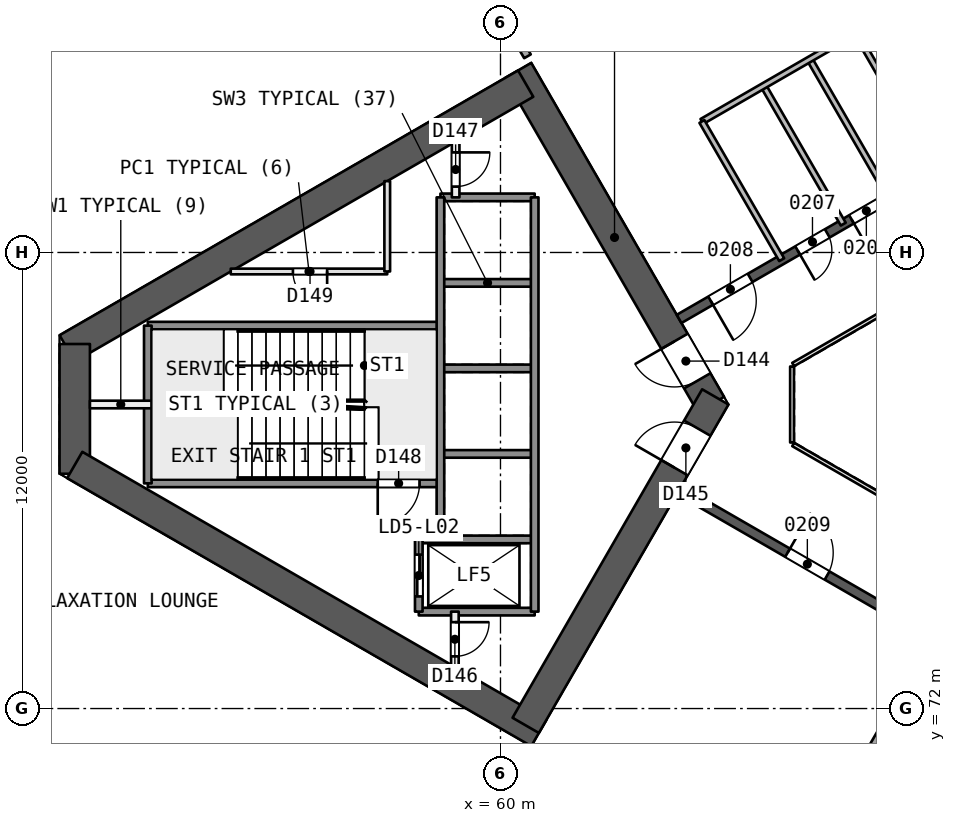
"""IFC4 building model, lengths in metres.
Left out: names, types, materials, properties, quantities, classifications, styles, units other than length and angle.
Written with IfcOpenShell. Run it as: python <this file> out.ifc"""

import sys

from ifc_helpers import new_model, si_unit, direction, frame, frame_2d, origin, place, context, subcontext, project, spatial, rectangle, extrude, element, fill, save


model = new_model("IFC4")
c1 = context("Model", 3, precision=1e-05, world=origin(), true_north=direction((0.0, 1.0)))
c2 = subcontext(c1, "Body", "Model", "MODEL_VIEW")
j1 = project(units=[si_unit("LENGTHUNIT", "METRE"), si_unit("PLANEANGLEUNIT", "RADIAN")], contexts=[c1])
p1 = place(None, origin())
s1 = spatial("IfcSite", under=j1, at=p1, CompositionType="ELEMENT")
p2 = place(p1, origin())
s2 = spatial("IfcBuilding", under=s1, at=p2, CompositionType="ELEMENT")
p3 = place(p2, frame((0.0, 0.0, 15.0)))
s3 = spatial("IfcBuildingStorey", under=s2, at=p3, CompositionType="ELEMENT", Elevation=15.0)
p4 = place(p3, frame((65.538, 80.0, 0.0), z_axis=(0.0, 0.0, 1.0), x_axis=(-0.49999662545, 0.866027352073, 0.0)))
e1 = element("IfcWall", 1, at=p4, inside=s3, PredefinedType="SHEAR", context=c2, shape_type="SweptSolid", body=[
    extrude(rectangle(XDim=10.149, YDim=0.8, at=frame_2d((5.074, 0.0))), origin(), (0.0, 0.0, 1.0), 5.4),
])
p5 = place(p4, frame((0.719, 0.0, 0.0)))
e2 = element("IfcOpeningElement", 2, at=p5, cuts=e1, PredefinedType="OPENING", context=c2, shape_type="SweptSolid", body=[
    extrude(rectangle(XDim=1.2, YDim=2.1, at=frame_2d((0.6, 1.05))), frame((0.0, 0.411, 0.0), z_axis=(0.0, -1.0, 0.0), x_axis=(1.0, 0.0, 0.0)), (0.0, 0.0, 1.0), 0.821),
])
p6 = place(p3, frame((60.664, 88.443, 0.0), z_axis=(0.0, 0.0, 1.0), x_axis=(-0.866029478545, -0.499992942241, 0.0)))
e3 = element("IfcWall", 3, at=p6, inside=s3, PredefinedType="SHEAR", context=c2, shape_type="SweptSolid", body=[
    extrude(rectangle(XDim=13.933, YDim=0.8, at=frame_2d((6.967, 0.0))), origin(), (0.0, 0.0, 1.0), 5.4),
])
p7 = place(p3, frame((48.797, 81.592, 0.0), z_axis=(0.0, 0.0, 1.0), x_axis=(0.0, -1.0, 0.0)))
e4 = element("IfcWall", 4, at=p7, inside=s3, PredefinedType="SHEAR", context=c2, shape_type="SweptSolid", body=[
    extrude(rectangle(XDim=3.415, YDim=0.8, at=frame_2d((1.707, 0.0))), origin(), (0.0, 0.0, 1.0), 5.4),
])
p8 = place(p3, frame((48.797, 78.408, 0.0), z_axis=(0.0, 0.0, 1.0), x_axis=(0.866032504327, -0.499987701298, 0.0)))
e5 = element("IfcWall", 5, at=p8, inside=s3, PredefinedType="SHEAR", context=c2, shape_type="SweptSolid", body=[
    extrude(rectangle(XDim=14.102, YDim=0.8, at=frame_2d((7.051, 0.0))), origin(), (0.0, 0.0, 1.0), 5.4),
])
p9 = place(p3, frame((60.664, 71.557, 0.0), z_axis=(0.0, 0.0, 1.0), x_axis=(0.50000409368, 0.866023040284, 0.0)))
e6 = element("IfcWall", 6, at=p9, inside=s3, PredefinedType="SHEAR", context=c2, shape_type="SweptSolid", body=[
    extrude(rectangle(XDim=9.98, YDim=0.8, at=frame_2d((4.99, 0.0))), origin(), (0.0, 0.0, 1.0), 5.4),
])
p10 = place(p9, frame((7.83, 0.0, 0.0)))
e7 = element("IfcOpeningElement", 7, at=p10, cuts=e6, PredefinedType="OPENING", context=c2, shape_type="SweptSolid", body=[
    extrude(rectangle(XDim=1.2, YDim=2.1, at=frame_2d((0.6, 1.05))), frame((0.0, 0.411, 0.0), z_axis=(0.0, -1.0, 0.0), x_axis=(1.0, 0.0, 0.0)), (0.0, 0.0, 1.0), 0.821),
])
p11 = place(p3, frame((78.2, 90.046, 0.0), z_axis=(0.0, 0.0, 1.0), x_axis=(-0.866026492143, -0.499998114903, 0.0)))
e8 = element("IfcWall", 8, at=p11, inside=s3, PredefinedType="SHEAR", context=c2, shape_type="SweptSolid", body=[
    extrude(rectangle(XDim=15.588, YDim=0.25, at=frame_2d((7.794, 0.0))), origin(), (0.0, 0.0, 1.0), 5.0),
])
p12 = place(p11, frame((3.297, 0.0, 0.0)))
e9 = element("IfcOpeningElement", 9, at=p12, cuts=e8, PredefinedType="OPENING", context=c2, shape_type="SweptSolid", body=[
    extrude(rectangle(XDim=1.2, YDim=2.4, at=frame_2d((0.6, 1.2))), frame((0.0, 0.135, 0.0), z_axis=(0.0, -1.0, 0.0), x_axis=(1.0, 0.0, 0.0)), (0.0, 0.0, 1.0), 0.271),
])
p13 = place(p11, frame((8.046, 0.0, 0.0)))
e10 = element("IfcOpeningElement", 10, at=p13, cuts=e8, PredefinedType="OPENING", context=c2, shape_type="SweptSolid", body=[
    extrude(rectangle(XDim=0.9, YDim=2.1, at=frame_2d((0.45, 1.05))), frame((0.0, 0.135, 0.0), z_axis=(0.0, -1.0, 0.0), x_axis=(1.0, 0.0, 0.0)), (0.0, 0.0, 1.0), 0.271),
])
p14 = place(p11, frame((9.449, 0.0, 0.0)))
e11 = element("IfcOpeningElement", 11, at=p14, cuts=e8, PredefinedType="OPENING", context=c2, shape_type="SweptSolid", body=[
    extrude(rectangle(XDim=0.9, YDim=2.1, at=frame_2d((0.45, 1.05))), frame((0.0, 0.135, 0.0), z_axis=(0.0, -1.0, 0.0), x_axis=(1.0, 0.0, 0.0)), (0.0, 0.0, 1.0), 0.271),
])
p15 = place(p11, frame((11.085, 0.0, 0.0)))
e12 = element("IfcOpeningElement", 12, at=p15, cuts=e8, PredefinedType="OPENING", context=c2, shape_type="SweptSolid", body=[
    extrude(rectangle(XDim=0.9, YDim=2.1, at=frame_2d((0.45, 1.05))), frame((0.0, 0.135, 0.0), z_axis=(0.0, -1.0, 0.0), x_axis=(1.0, 0.0, 0.0)), (0.0, 0.0, 1.0), 0.271),
])
p16 = place(p11, frame((13.43, 0.0, 0.0)))
e13 = element("IfcOpeningElement", 13, at=p16, cuts=e8, PredefinedType="OPENING", context=c2, shape_type="SweptSolid", body=[
    extrude(rectangle(XDim=1.2, YDim=2.4, at=frame_2d((0.6, 1.2))), frame((0.0, 0.135, 0.0), z_axis=(0.0, -1.0, 0.0), x_axis=(1.0, 0.0, 0.0)), (0.0, 0.0, 1.0), 0.271),
])
p17 = place(p3, frame((64.7, 77.748, 0.0), z_axis=(0.0, 0.0, 1.0), x_axis=(0.866026492143, -0.499998114903, 0.0)))
e14 = element("IfcWall", 14, at=p17, inside=s3, PredefinedType="SHEAR", context=c2, shape_type="SweptSolid", body=[
    extrude(rectangle(XDim=15.588, YDim=0.25, at=frame_2d((7.794, 0.0))), origin(), (0.0, 0.0, 1.0), 5.0),
])
p18 = place(p17, frame((3.297, 0.0, 0.0)))
e15 = element("IfcOpeningElement", 15, at=p18, cuts=e14, PredefinedType="OPENING", context=c2, shape_type="SweptSolid", body=[
    extrude(rectangle(XDim=1.2, YDim=2.4, at=frame_2d((0.6, 1.2))), frame((0.0, 0.135, 0.0), z_axis=(0.0, -1.0, 0.0), x_axis=(1.0, 0.0, 0.0)), (0.0, 0.0, 1.0), 0.271),
])
p19 = place(p17, frame((11.091, 0.0, 0.0)))
e16 = element("IfcOpeningElement", 16, at=p19, cuts=e14, PredefinedType="OPENING", context=c2, shape_type="SweptSolid", body=[
    extrude(rectangle(XDim=1.2, YDim=2.4, at=frame_2d((0.6, 1.2))), frame((0.0, 0.135, 0.0), z_axis=(0.0, -1.0, 0.0), x_axis=(1.0, 0.0, 0.0)), (0.0, 0.0, 1.0), 0.271),
])
p20 = place(p3, frame((69.35, 89.786, 0.0), z_axis=(0.0, 0.0, 1.0), x_axis=(0.499958946799, -0.866049104564, 0.0)))
e17 = element("IfcWall", 17, at=p20, inside=s3, PredefinedType="PARTITIONING", context=c2, shape_type="SweptSolid", body=[
    extrude(rectangle(XDim=4.2, YDim=0.15, at=frame_2d((2.1, 0.0))), origin(), (0.0, 0.0, 1.0), 5.0),
])
p21 = place(p3, frame((68.135, 89.085, 0.0), z_axis=(0.0, 0.0, 1.0), x_axis=(0.500002543286, -0.866023935413, 0.0)))
e18 = element("IfcWall", 18, at=p21, inside=s3, PredefinedType="PARTITIONING", context=c2, shape_type="SweptSolid", body=[
    extrude(rectangle(XDim=4.2, YDim=0.15, at=frame_2d((2.1, 0.0))), origin(), (0.0, 0.0, 1.0), 5.0),
])
p22 = place(p3, frame((66.92, 88.383, 0.0), z_axis=(0.0, 0.0, 1.0), x_axis=(0.500027713859, -0.866009402589, 0.0)))
e19 = element("IfcWall", 19, at=p22, inside=s3, PredefinedType="PARTITIONING", context=c2, shape_type="SweptSolid", body=[
    extrude(rectangle(XDim=4.2, YDim=0.15, at=frame_2d((2.1, 0.0))), origin(), (0.0, 0.0, 1.0), 5.0),
])
p23 = place(p3, frame((69.351, 89.785, 0.0), z_axis=(0.0, 0.0, 1.0), x_axis=(-0.866040404911, -0.499974016386, 0.0)))
e20 = element("IfcWall", 20, at=p23, inside=s3, PredefinedType="PARTITIONING", context=c2, shape_type="SweptSolid", body=[
    extrude(rectangle(XDim=4.677, YDim=0.15, at=frame_2d((2.338, 0.0))), origin(), (0.0, 0.0, 1.0), 5.0),
])
p24 = place(p3, frame((65.301, 87.447, 0.0), z_axis=(0.0, 0.0, 1.0), x_axis=(0.499972428603, -0.866041321553, 0.0)))
e21 = element("IfcWall", 21, at=p24, inside=s3, PredefinedType="PARTITIONING", context=c2, shape_type="SweptSolid", body=[
    extrude(rectangle(XDim=4.199, YDim=0.15, at=frame_2d((2.1, 0.0))), origin(), (0.0, 0.0, 1.0), 5.0),
])
p25 = place(p3, frame((57.274, 95.115, 0.0), z_axis=(0.0, 0.0, 1.0), x_axis=(0.499985838573, -0.866033579734, 0.0)))
e22 = element("IfcWall", 22, at=p25, inside=s3, PredefinedType="PARTITIONING", context=c2, shape_type="SweptSolid", body=[
    extrude(rectangle(XDim=6.874, YDim=0.2, at=frame_2d((3.437, 0.0))), origin(), (0.0, 0.0, 1.0), 5.0),
])
p26 = place(p3, frame((60.85, 55.491, 0.0), z_axis=(0.0, 0.0, 1.0), x_axis=(0.499994584841, 0.866028530205, 0.0)))
e23 = element("IfcWall", 23, at=p26, inside=s3, PredefinedType="PARTITIONING", context=c2, shape_type="SweptSolid", body=[
    extrude(rectangle(XDim=21.201, YDim=0.2, at=frame_2d((10.601, 0.0))), origin(), (0.0, 0.0, 1.0), 5.0),
])
p27 = place(p3, frame((26.66, 85.0, 0.0), z_axis=(0.0, 0.0, 1.0), x_axis=(0.866025599265, 0.499999661418, 0.0)))
e24 = element("IfcWall", 24, at=p27, inside=s3, PredefinedType="SOLIDWALL", context=c2, shape_type="SweptSolid", body=[
    extrude(rectangle(XDim=78.727, YDim=0.4, at=frame_2d((39.364, 0.0))), origin(), (0.0, 0.0, 1.0), 5.0),
])
p28 = place(p27, frame((42.061, 0.0, 0.9)))
e25 = element("IfcOpeningElement", 25, at=p28, cuts=e24, PredefinedType="OPENING", context=c2, shape_type="SweptSolid", body=[
    extrude(rectangle(XDim=2.4, YDim=2.4, at=frame_2d((1.2, 1.2))), frame((0.0, 0.21, 0.0), z_axis=(0.0, -1.0, 0.0), x_axis=(1.0, 0.0, 0.0)), (0.0, 0.0, 1.0), 0.421),
])
p29 = place(p27, frame((34.267, 0.0, 0.9)))
e26 = element("IfcOpeningElement", 26, at=p29, cuts=e24, PredefinedType="OPENING", context=c2, shape_type="SweptSolid", body=[
    extrude(rectangle(XDim=2.4, YDim=2.4, at=frame_2d((1.2, 1.2))), frame((0.0, 0.21, 0.0), z_axis=(0.0, -1.0, 0.0), x_axis=(1.0, 0.0, 0.0)), (0.0, 0.0, 1.0), 0.421),
])
p30 = place(p3, frame((94.84, 35.636, 0.0), z_axis=(0.0, 0.0, 1.0), x_axis=(-0.866025599265, 0.499999661418, 0.0)))
e27 = element("IfcWall", 27, at=p30, inside=s3, PredefinedType="SOLIDWALL", context=c2, shape_type="SweptSolid", body=[
    extrude(rectangle(XDim=78.727, YDim=0.4, at=frame_2d((39.364, 0.0))), origin(), (0.0, 0.0, 1.0), 5.0),
])
p31 = place(p30, frame((42.061, 0.0, 0.9)))
e28 = element("IfcOpeningElement", 28, at=p31, cuts=e27, PredefinedType="OPENING", context=c2, shape_type="SweptSolid", body=[
    extrude(rectangle(XDim=2.4, YDim=2.4, at=frame_2d((1.2, 1.2))), frame((0.0, 0.21, 0.0), z_axis=(0.0, -1.0, 0.0), x_axis=(1.0, 0.0, 0.0)), (0.0, 0.0, 1.0), 0.421),
])
p32 = place(p3, frame((60.9, 85.45, 0.0), z_axis=(0.0, 0.0, 1.0), x_axis=(-1.0, 0.0, 0.0)))
e29 = element("IfcWall", 29, at=p32, inside=s3, PredefinedType="SOLIDWALL", context=c2, shape_type="SweptSolid", body=[
    extrude(rectangle(XDim=2.48, YDim=0.2, at=frame_2d((1.24, 0.0))), origin(), (0.0, 0.0, 1.0), 5.0),
])
p33 = place(p3, frame((57.02, 83.5, 0.0), z_axis=(0.0, 0.0, 1.0), x_axis=(-1.0, 0.0, 0.0)))
e30 = element("IfcWall", 30, at=p33, inside=s3, PredefinedType="PARTITIONING", context=c2, shape_type="SweptSolid", body=[
    extrude(rectangle(XDim=4.118, YDim=0.15, at=frame_2d((2.059, 0.0))), origin(), (0.0, 0.0, 1.0), 5.0),
])
p34 = place(p33, frame((1.582, 0.0, 0.0)))
e31 = element("IfcOpeningElement", 31, at=p34, cuts=e30, PredefinedType="OPENING", context=c2, shape_type="SweptSolid", body=[
    extrude(rectangle(XDim=0.9, YDim=2.1, at=frame_2d((0.45, 1.05))), frame((0.0, 0.085, 0.0), z_axis=(0.0, -1.0, 0.0), x_axis=(1.0, 0.0, 0.0)), (0.0, 0.0, 1.0), 0.171),
])
p35 = place(p3, frame((60.9, 83.2, 0.0), z_axis=(0.0, 0.0, 1.0), x_axis=(-1.0, 0.0, 0.0)))
e32 = element("IfcWall", 32, at=p35, inside=s3, PredefinedType="SOLIDWALL", context=c2, shape_type="SweptSolid", body=[
    extrude(rectangle(XDim=2.48, YDim=0.2, at=frame_2d((1.24, 0.0))), origin(), (0.0, 0.0, 1.0), 5.0),
])
p36 = place(p3, frame((58.42, 82.075, 0.0), z_axis=(0.0, 0.0, 1.0), x_axis=(-1.0, 0.0, 0.0)))
e33 = element("IfcWall", 33, at=p36, inside=s3, PredefinedType="SOLIDWALL", context=c2, shape_type="SweptSolid", body=[
    extrude(rectangle(XDim=7.7, YDim=0.2, at=frame_2d((3.85, 0.0))), origin(), (0.0, 0.0, 1.0), 5.0),
])
p37 = place(p3, frame((60.9, 80.95, 0.0), z_axis=(0.0, 0.0, 1.0), x_axis=(-1.0, 0.0, 0.0)))
e34 = element("IfcWall", 34, at=p37, inside=s3, PredefinedType="SOLIDWALL", context=c2, shape_type="SweptSolid", body=[
    extrude(rectangle(XDim=2.48, YDim=0.2, at=frame_2d((1.24, 0.0))), origin(), (0.0, 0.0, 1.0), 5.0),
])
p38 = place(p3, frame((50.82, 80.0, 0.0), z_axis=(0.0, 0.0, 1.0), x_axis=(-1.0, 0.0, 0.0)))
e35 = element("IfcWall", 35, at=p38, inside=s3, PredefinedType="PARTITIONING", context=c2, shape_type="SweptSolid", body=[
    extrude(rectangle(XDim=1.623, YDim=0.2, at=frame_2d((0.812, 0.0))), origin(), (0.0, 0.0, 1.0), 5.0),
])
p39 = place(p3, frame((60.9, 78.7, 0.0), z_axis=(0.0, 0.0, 1.0), x_axis=(-1.0, 0.0, 0.0)))
e36 = element("IfcWall", 36, at=p39, inside=s3, PredefinedType="SOLIDWALL", context=c2, shape_type="SweptSolid", body=[
    extrude(rectangle(XDim=2.48, YDim=0.2, at=frame_2d((1.24, 0.0))), origin(), (0.0, 0.0, 1.0), 5.0),
])
p40 = place(p3, frame((58.42, 77.925, 0.0), z_axis=(0.0, 0.0, 1.0), x_axis=(-1.0, 0.0, 0.0)))
e37 = element("IfcWall", 37, at=p40, inside=s3, PredefinedType="SOLIDWALL", context=c2, shape_type="SweptSolid", body=[
    extrude(rectangle(XDim=7.7, YDim=0.2, at=frame_2d((3.85, 0.0))), origin(), (0.0, 0.0, 1.0), 5.0),
])
p41 = place(p40, frame((0.55, 0.0, 0.0)))
e38 = element("IfcOpeningElement", 38, at=p41, cuts=e37, PredefinedType="OPENING", context=c2, shape_type="SweptSolid", body=[
    extrude(rectangle(XDim=1.1, YDim=2.1, at=frame_2d((0.55, 1.05))), frame((0.0, 0.11, 0.0), z_axis=(0.0, -1.0, 0.0), x_axis=(1.0, 0.0, 0.0)), (0.0, 0.0, 1.0), 0.221),
])
for number, where, z_axis, x_axis in (
    (39, (60.9, 76.45, 0.0), (0.0, 0.0, 1.0), (-1.0, 0.0, 0.0)),
    (40, (60.9, 74.55, 0.0), (0.0, 0.0, 1.0), (-1.0, 0.0, 0.0)),
):
    element("IfcWall", number, at=place(p3, frame(where, z_axis=z_axis, x_axis=x_axis)), inside=s3, PredefinedType="SOLIDWALL", context=c2, shape_type="SweptSolid", body=[
        extrude(rectangle(XDim=3.05, YDim=0.2, at=frame_2d((1.525, 0.0))), origin(), (0.0, 0.0, 1.0), 5.0),
    ])
p42 = place(p3, frame((60.9, 85.45, 0.0), z_axis=(0.0, 0.0, 1.0), x_axis=(0.0, -1.0, 0.0)))
e41 = element("IfcWall", 41, at=p42, inside=s3, PredefinedType="SOLIDWALL", context=c2, shape_type="SweptSolid", body=[
    extrude(rectangle(XDim=10.9, YDim=0.2, at=frame_2d((5.45, 0.0))), origin(), (0.0, 0.0, 1.0), 5.0),
])
p43 = place(p3, frame((58.82, 86.917, 0.0), z_axis=(0.0, 0.0, 1.0), x_axis=(0.0, -1.0, 0.0)))
e42 = element("IfcWall", 42, at=p43, inside=s3, PredefinedType="PARTITIONING", context=c2, shape_type="SweptSolid", body=[
    extrude(rectangle(XDim=1.467, YDim=0.2, at=frame_2d((0.733, 0.0))), origin(), (0.0, 0.0, 1.0), 5.0),
])
p44 = place(p43, frame((0.283, 0.0, 0.0)))
e43 = element("IfcOpeningElement", 43, at=p44, cuts=e42, PredefinedType="OPENING", context=c2, shape_type="SweptSolid", body=[
    extrude(rectangle(XDim=0.9, YDim=2.1, at=frame_2d((0.45, 1.05))), frame((0.0, 0.11, 0.0), z_axis=(0.0, -1.0, 0.0), x_axis=(1.0, 0.0, 0.0)), (0.0, 0.0, 1.0), 0.221),
])
p45 = place(p3, frame((58.8, 74.55, 0.0), z_axis=(0.0, 0.0, 1.0), x_axis=(0.0, -1.0, 0.0)))
e44 = element("IfcWall", 44, at=p45, inside=s3, PredefinedType="PARTITIONING", context=c2, shape_type="SweptSolid", body=[
    extrude(rectangle(XDim=1.455, YDim=0.2, at=frame_2d((0.728, 0.0))), origin(), (0.0, 0.0, 1.0), 5.0),
])
p46 = place(p45, frame((0.278, 0.0, 0.0)))
e45 = element("IfcOpeningElement", 45, at=p46, cuts=e44, PredefinedType="OPENING", context=c2, shape_type="SweptSolid", body=[
    extrude(rectangle(XDim=0.9, YDim=2.1, at=frame_2d((0.45, 1.05))), frame((0.0, 0.11, 0.0), z_axis=(0.0, -1.0, 0.0), x_axis=(1.0, 0.0, 0.0)), (0.0, 0.0, 1.0), 0.221),
])
p47 = place(p3, frame((58.42, 85.45, 0.0), z_axis=(0.0, 0.0, 1.0), x_axis=(0.0, -1.0, 0.0)))
e46 = element("IfcWall", 46, at=p47, inside=s3, PredefinedType="SOLIDWALL", context=c2, shape_type="SweptSolid", body=[
    extrude(rectangle(XDim=9.0, YDim=0.2, at=frame_2d((4.5, 0.0))), origin(), (0.0, 0.0, 1.0), 5.0),
])
p48 = place(p3, frame((57.85, 76.45, 0.0), z_axis=(0.0, 0.0, 1.0), x_axis=(0.0, -1.0, 0.0)))
e47 = element("IfcWall", 47, at=p48, inside=s3, PredefinedType="SOLIDWALL", context=c2, shape_type="SweptSolid", body=[
    extrude(rectangle(XDim=1.9, YDim=0.2, at=frame_2d((0.95, 0.0))), origin(), (0.0, 0.0, 1.0), 5.0),
])
p49 = place(p48, frame((0.4, 0.0, 0.0)))
e48 = element("IfcOpeningElement", 48, at=p49, cuts=e47, PredefinedType="OPENING", context=c2, shape_type="SweptSolid", body=[
    extrude(rectangle(XDim=1.1, YDim=2.1, at=frame_2d((0.55, 1.05))), frame((0.0, 0.11, 0.0), z_axis=(0.0, -1.0, 0.0), x_axis=(1.0, 0.0, 0.0)), (0.0, 0.0, 1.0), 0.221),
])
p50 = place(p3, frame((57.02, 85.877, 0.0), z_axis=(0.0, 0.0, 1.0), x_axis=(0.0, -1.0, 0.0)))
e49 = element("IfcWall", 49, at=p50, inside=s3, PredefinedType="PARTITIONING", context=c2, shape_type="SweptSolid", body=[
    extrude(rectangle(XDim=2.377, YDim=0.15, at=frame_2d((1.189, 0.0))), origin(), (0.0, 0.0, 1.0), 5.0),
])
p51 = place(p3, frame((50.72, 82.075, 0.0), z_axis=(0.0, 0.0, 1.0), x_axis=(0.0, -1.0, 0.0)))
e50 = element("IfcWall", 50, at=p51, inside=s3, PredefinedType="SOLIDWALL", context=c2, shape_type="SweptSolid", body=[
    extrude(rectangle(XDim=4.15, YDim=0.2, at=frame_2d((2.075, 0.0))), origin(), (0.0, 0.0, 1.0), 5.0),
])
p52 = place(p3, frame((77.738, 86.846, 0.0), z_axis=(0.0, 0.0, 1.0), x_axis=(-0.866026658274, -0.499997827154, 0.0)))
e51 = element("IfcWall", 51, at=p52, inside=s3, PredefinedType="PARTITIONING", context=c2, shape_type="SweptSolid", body=[
    extrude(rectangle(XDim=11.588, YDim=0.1, at=frame_2d((5.794, 0.0))), origin(), (0.0, 0.0, 1.0), 5.0),
])
p53 = place(p3, frame((67.672, 81.0, 0.0), z_axis=(0.0, 0.0, 1.0), x_axis=(0.0, -1.0, 0.0)))
e52 = element("IfcWall", 52, at=p53, inside=s3, PredefinedType="PARTITIONING", context=c2, shape_type="SweptSolid", body=[
    extrude(rectangle(XDim=2.0, YDim=0.1, at=frame_2d((1.0, 0.0))), origin(), (0.0, 0.0, 1.0), 5.0),
])
p54 = place(p3, frame((67.702, 78.948, 0.0), z_axis=(0.0, 0.0, 1.0), x_axis=(0.866026658274, -0.499997827154, 0.0)))
e53 = element("IfcWall", 53, at=p54, inside=s3, PredefinedType="PARTITIONING", context=c2, shape_type="SweptSolid", body=[
    extrude(rectangle(XDim=11.588, YDim=0.1, at=frame_2d((5.794, 0.0))), origin(), (0.0, 0.0, 1.0), 5.0),
])
p55 = place(p14, origin())
e54 = element("IfcDoor", 54, at=p55, inside=s3, OperationType="SINGLE_SWING_RIGHT", PredefinedType="NOTDEFINED", context=c2, shape_type="SweptSolid", body=[
    extrude(rectangle(XDim=0.9, YDim=2.1, at=frame_2d((0.45, 1.05))), frame((0.0, 0.025, 0.0), z_axis=(0.0, -1.0, 0.0), x_axis=(1.0, 0.0, 0.0)), (0.0, 0.0, 1.0), 0.05),
])
fill(e11, e54)
p56 = place(p15, origin())
e55 = element("IfcDoor", 55, at=p56, inside=s3, OperationType="SINGLE_SWING_RIGHT", PredefinedType="NOTDEFINED", context=c2, shape_type="SweptSolid", body=[
    extrude(rectangle(XDim=0.9, YDim=2.1, at=frame_2d((0.45, 1.05))), frame((0.0, 0.025, 0.0), z_axis=(0.0, -1.0, 0.0), x_axis=(1.0, 0.0, 0.0)), (0.0, 0.0, 1.0), 0.05),
])
fill(e12, e55)
p57 = place(p16, origin())
e56 = element("IfcDoor", 56, at=p57, inside=s3, OperationType="SINGLE_SWING_RIGHT", PredefinedType="NOTDEFINED", context=c2, shape_type="SweptSolid", body=[
    extrude(rectangle(XDim=1.2, YDim=2.4, at=frame_2d((0.6, 1.2))), frame((0.0, 0.025, 0.0), z_axis=(0.0, -1.0, 0.0), x_axis=(1.0, 0.0, 0.0)), (0.0, 0.0, 1.0), 0.05),
])
fill(e13, e56)
p58 = place(p18, origin())
e57 = element("IfcDoor", 57, at=p58, inside=s3, OperationType="SINGLE_SWING_LEFT", PredefinedType="NOTDEFINED", context=c2, shape_type="SweptSolid", body=[
    extrude(rectangle(XDim=1.2, YDim=2.4, at=frame_2d((0.6, 1.2))), frame((0.0, 0.025, 0.0), z_axis=(0.0, -1.0, 0.0), x_axis=(1.0, 0.0, 0.0)), (0.0, 0.0, 1.0), 0.05),
])
fill(e15, e57)
p59 = place(p5, origin())
e58 = element("IfcDoor", 58, at=p59, inside=s3, OperationType="SINGLE_SWING_RIGHT", PredefinedType="NOTDEFINED", context=c2, shape_type="SweptSolid", body=[
    extrude(rectangle(XDim=1.2, YDim=2.1, at=frame_2d((0.6, 1.05))), frame((0.0, 0.025, 0.0), z_axis=(0.0, -1.0, 0.0), x_axis=(1.0, 0.0, 0.0)), (0.0, 0.0, 1.0), 0.05),
])
fill(e2, e58)
p60 = place(p10, origin())
e59 = element("IfcDoor", 59, at=p60, inside=s3, OperationType="SINGLE_SWING_LEFT", PredefinedType="NOTDEFINED", context=c2, shape_type="SweptSolid", body=[
    extrude(rectangle(XDim=1.2, YDim=2.1, at=frame_2d((0.6, 1.05))), frame((0.0, 0.025, 0.0), z_axis=(0.0, -1.0, 0.0), x_axis=(1.0, 0.0, 0.0)), (0.0, 0.0, 1.0), 0.05),
])
fill(e7, e59)
p61 = place(p49, origin())
e60 = element("IfcDoor", 60, at=p61, inside=s3, OperationType="SLIDING_TO_RIGHT", PredefinedType="NOTDEFINED", context=c2, shape_type="SweptSolid", body=[
    extrude(rectangle(XDim=1.1, YDim=2.1, at=frame_2d((0.55, 1.05))), frame((0.0, 0.025, 0.0), z_axis=(0.0, -1.0, 0.0), x_axis=(1.0, 0.0, 0.0)), (0.0, 0.0, 1.0), 0.05),
])
fill(e48, e60)
p62 = place(p46, origin())
e61 = element("IfcDoor", 61, at=p62, inside=s3, OperationType="SINGLE_SWING_LEFT", PredefinedType="NOTDEFINED", context=c2, shape_type="SweptSolid", body=[
    extrude(rectangle(XDim=0.9, YDim=2.1, at=frame_2d((0.45, 1.05))), frame((0.0, 0.025, 0.0), z_axis=(0.0, -1.0, 0.0), x_axis=(1.0, 0.0, 0.0)), (0.0, 0.0, 1.0), 0.05),
])
fill(e45, e61)
p63 = place(p44, origin())
e62 = element("IfcDoor", 62, at=p63, inside=s3, OperationType="SINGLE_SWING_LEFT", PredefinedType="NOTDEFINED", context=c2, shape_type="SweptSolid", body=[
    extrude(rectangle(XDim=0.9, YDim=2.1, at=frame_2d((0.45, 1.05))), frame((0.0, 0.025, 0.0), z_axis=(0.0, -1.0, 0.0), x_axis=(1.0, 0.0, 0.0)), (0.0, 0.0, 1.0), 0.05),
])
fill(e43, e62)
p64 = place(p41, origin())
e63 = element("IfcDoor", 63, at=p64, inside=s3, OperationType="SINGLE_SWING_RIGHT", PredefinedType="NOTDEFINED", context=c2, shape_type="SweptSolid", body=[
    extrude(rectangle(XDim=1.1, YDim=2.1, at=frame_2d((0.55, 1.05))), frame((0.0, 0.025, 0.0), z_axis=(0.0, -1.0, 0.0), x_axis=(1.0, 0.0, 0.0)), (0.0, 0.0, 1.0), 0.05),
])
fill(e38, e63)
p65 = place(p34, origin())
e64 = element("IfcDoor", 64, at=p65, inside=s3, OperationType="SINGLE_SWING_LEFT", PredefinedType="NOTDEFINED", context=c2, shape_type="SweptSolid", body=[
    extrude(rectangle(XDim=0.9, YDim=2.1, at=frame_2d((0.45, 1.05))), frame((0.0, 0.025, 0.0), z_axis=(0.0, -1.0, 0.0), x_axis=(1.0, 0.0, 0.0)), (0.0, 0.0, 1.0), 0.05),
])
fill(e31, e64)
save(model, sys.argv[1])
